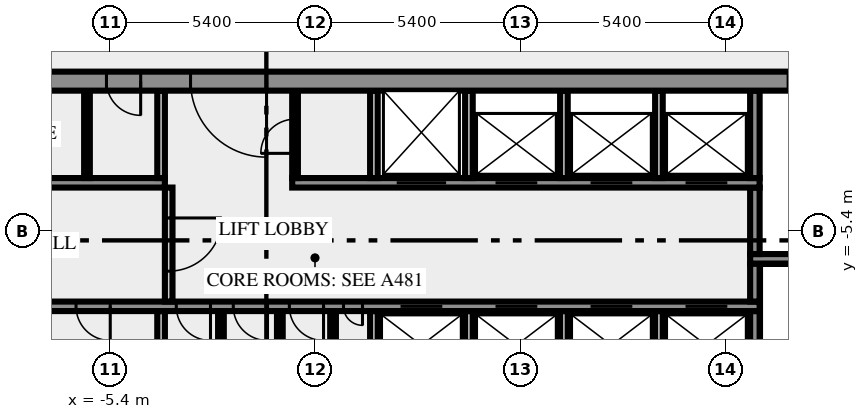
"""IFC4 building model, lengths in metres.
Left out: names, types, materials, properties, quantities, classifications, styles, units other than length and angle.
Written with IfcOpenShell. Run it as: python <this file> out.ifc"""

import sys

from ifc_helpers import new_model, si_unit, direction, frame, frame_2d, origin, place, context, subcontext, project, spatial, rectangle, extrude, element, fill, save


model = new_model("IFC4")
c1 = context("Model", 3, precision=1e-05, world=origin(), true_north=direction((0.0, 1.0)))
c2 = subcontext(c1, "Body", "Model", "MODEL_VIEW")
j1 = project(units=[si_unit("LENGTHUNIT", "METRE"), si_unit("PLANEANGLEUNIT", "RADIAN")], contexts=[c1])
p1 = place(None, origin())
s1 = spatial("IfcSite", under=j1, at=p1, CompositionType="ELEMENT")
p2 = place(p1, origin())
s2 = spatial("IfcBuilding", under=s1, at=p2, CompositionType="ELEMENT")
p3 = place(p2, frame((0.0, 0.0, 156.0)))
s3 = spatial("IfcBuildingStorey", under=s2, at=p3, CompositionType="ELEMENT", Elevation=156.0)
p4 = place(p3, frame((-4.05, -10.5, 0.0), z_axis=(0.0, 0.0, 1.0), x_axis=(0.0, 1.0, 0.0)))
e1 = element("IfcWall", 1, at=p4, inside=s3, PredefinedType="SOLIDWALL", context=c2, shape_type="SweptSolid", body=[
    extrude(rectangle(XDim=3.0, YDim=0.2, at=frame_2d((1.5, 0.0))), origin(), (0.0, 0.0, 1.0), 3.65),
])
for number, where, z_axis, x_axis in (
    (2, (-2.475, -10.5, 0.0), (0.0, 0.0, 1.0), (0.0, 1.0, 0.0)),
    (3, (-0.925, -10.5, 0.0), (0.0, 0.0, 1.0), (0.0, 1.0, 0.0)),
    (4, (0.475, -10.5, 0.0), (0.0, 0.0, 1.0), (0.0, 1.0, 0.0)),
):
    element("IfcWall", number, at=place(p3, frame(where, z_axis=z_axis, x_axis=x_axis)), inside=s3, PredefinedType="PARTITIONING", context=c2, shape_type="SweptSolid", body=[
        extrude(rectangle(XDim=3.0, YDim=0.15, at=frame_2d((1.5, 0.0))), origin(), (0.0, 0.0, 1.0), 3.65),
    ])
for number, where, z_axis, x_axis in (
    (5, (1.55, -10.5, 0.0), (0.0, 0.0, 1.0), (0.0, 1.0, 0.0)),
    (6, (4.05, -10.5, 0.0), (0.0, 0.0, 1.0), (0.0, 1.0, 0.0)),
    (7, (6.55, -10.5, 0.0), (0.0, 0.0, 1.0), (0.0, 1.0, 0.0)),
    (8, (9.05, -10.5, 0.0), (0.0, 0.0, 1.0), (0.0, 1.0, 0.0)),
):
    element("IfcWall", number, at=place(p3, frame(where, z_axis=z_axis, x_axis=x_axis)), inside=s3, PredefinedType="SOLIDWALL", context=c2, shape_type="SweptSolid", body=[
        extrude(rectangle(XDim=3.0, YDim=0.2, at=frame_2d((1.5, 0.0))), origin(), (0.0, 0.0, 1.0), 3.65),
    ])
p5 = place(p3, frame((11.575, -10.5, 0.0), z_axis=(0.0, 0.0, 1.0), x_axis=(0.0, 1.0, 0.0)))
e9 = element("IfcWall", 9, at=p5, inside=s3, PredefinedType="SHEAR", context=c2, shape_type="SweptSolid", body=[
    extrude(rectangle(XDim=3.0, YDim=0.25, at=frame_2d((1.5, 0.0))), origin(), (0.0, 0.0, 1.0), 3.65),
])
p6 = place(p3, frame((11.7, -7.375, 0.0), z_axis=(0.0, 0.0, 1.0), x_axis=(-1.0, 0.0, 0.0)))
e10 = element("IfcWall", 10, at=p6, inside=s3, PredefinedType="SHEAR", context=c2, shape_type="SweptSolid", body=[
    extrude(rectangle(XDim=23.4, YDim=0.25, at=frame_2d((11.7, 0.0))), origin(), (0.0, 0.0, 1.0), 3.65),
])
p7 = place(p6, frame((22.012, 0.0, 0.0)))
e11 = element("IfcOpeningElement", 11, at=p7, cuts=e10, PredefinedType="OPENING", context=c2, shape_type="SweptSolid", body=[
    extrude(rectangle(XDim=0.9, YDim=2.1, at=frame_2d((0.45, 1.05))), frame((0.0, 0.135, 0.0), z_axis=(0.0, -1.0, 0.0), x_axis=(1.0, 0.0, 0.0)), (0.0, 0.0, 1.0), 0.27),
])
p8 = place(p6, frame((20.05, 0.0, 0.0)))
e12 = element("IfcOpeningElement", 12, at=p8, cuts=e10, PredefinedType="OPENING", context=c2, shape_type="SweptSolid", body=[
    extrude(rectangle(XDim=0.9, YDim=2.1, at=frame_2d((0.45, 1.05))), frame((0.0, 0.135, 0.0), z_axis=(0.0, -1.0, 0.0), x_axis=(1.0, 0.0, 0.0)), (0.0, 0.0, 1.0), 0.27),
])
p9 = place(p6, frame((17.088, 0.0, 0.0)))
e13 = element("IfcOpeningElement", 13, at=p9, cuts=e10, PredefinedType="OPENING", context=c2, shape_type="SweptSolid", body=[
    extrude(rectangle(XDim=0.9, YDim=2.1, at=frame_2d((0.45, 1.05))), frame((0.0, 0.135, 0.0), z_axis=(0.0, -1.0, 0.0), x_axis=(1.0, 0.0, 0.0)), (0.0, 0.0, 1.0), 0.27),
])
p10 = place(p6, frame((14.45, 0.0, 0.0)))
e14 = element("IfcOpeningElement", 14, at=p10, cuts=e10, PredefinedType="OPENING", context=c2, shape_type="SweptSolid", body=[
    extrude(rectangle(XDim=0.9, YDim=2.1, at=frame_2d((0.45, 1.05))), frame((0.0, 0.135, 0.0), z_axis=(0.0, -1.0, 0.0), x_axis=(1.0, 0.0, 0.0)), (0.0, 0.0, 1.0), 0.27),
])
p11 = place(p6, frame((12.95, 0.0, 0.0)))
e15 = element("IfcOpeningElement", 15, at=p11, cuts=e10, PredefinedType="OPENING", context=c2, shape_type="SweptSolid", body=[
    extrude(rectangle(XDim=0.9, YDim=2.1, at=frame_2d((0.45, 1.05))), frame((0.0, 0.135, 0.0), z_axis=(0.0, -1.0, 0.0), x_axis=(1.0, 0.0, 0.0)), (0.0, 0.0, 1.0), 0.27),
])
p12 = place(p6, frame((11.475, 0.0, 0.0)))
e16 = element("IfcOpeningElement", 16, at=p12, cuts=e10, PredefinedType="OPENING", context=c2, shape_type="SweptSolid", body=[
    extrude(rectangle(XDim=0.9, YDim=2.1, at=frame_2d((0.45, 1.05))), frame((0.0, 0.135, 0.0), z_axis=(0.0, -1.0, 0.0), x_axis=(1.0, 0.0, 0.0)), (0.0, 0.0, 1.0), 0.27),
])
p13 = place(p6, frame((10.45, 0.0, 0.0)))
e17 = element("IfcOpeningElement", 17, at=p13, cuts=e10, PredefinedType="OPENING", context=c2, shape_type="SweptSolid", body=[
    extrude(rectangle(XDim=0.5, YDim=2.1, at=frame_2d((0.25, 1.05))), frame((0.0, 0.135, 0.0), z_axis=(0.0, -1.0, 0.0), x_axis=(1.0, 0.0, 0.0)), (0.0, 0.0, 1.0), 0.27),
])
p14 = place(p6, frame((8.35, 0.0, 0.0)))
e18 = element("IfcOpeningElement", 18, at=p14, cuts=e10, PredefinedType="OPENING", context=c2, shape_type="SweptSolid", body=[
    extrude(rectangle(XDim=1.1, YDim=2.1, at=frame_2d((0.55, 1.05))), frame((0.0, 0.135, 0.0), z_axis=(0.0, -1.0, 0.0), x_axis=(1.0, 0.0, 0.0)), (0.0, 0.0, 1.0), 0.27),
])
p15 = place(p6, frame((5.85, 0.0, 0.0)))
e19 = element("IfcOpeningElement", 19, at=p15, cuts=e10, PredefinedType="OPENING", context=c2, shape_type="SweptSolid", body=[
    extrude(rectangle(XDim=1.1, YDim=2.1, at=frame_2d((0.55, 1.05))), frame((0.0, 0.135, 0.0), z_axis=(0.0, -1.0, 0.0), x_axis=(1.0, 0.0, 0.0)), (0.0, 0.0, 1.0), 0.27),
])
p16 = place(p6, frame((3.35, 0.0, 0.0)))
e20 = element("IfcOpeningElement", 20, at=p16, cuts=e10, PredefinedType="OPENING", context=c2, shape_type="SweptSolid", body=[
    extrude(rectangle(XDim=1.1, YDim=2.1, at=frame_2d((0.55, 1.05))), frame((0.0, 0.135, 0.0), z_axis=(0.0, -1.0, 0.0), x_axis=(1.0, 0.0, 0.0)), (0.0, 0.0, 1.0), 0.27),
])
p17 = place(p6, frame((0.85, 0.0, 0.0)))
e21 = element("IfcOpeningElement", 21, at=p17, cuts=e10, PredefinedType="OPENING", context=c2, shape_type="SweptSolid", body=[
    extrude(rectangle(XDim=1.1, YDim=2.1, at=frame_2d((0.55, 1.05))), frame((0.0, 0.135, 0.0), z_axis=(0.0, -1.0, 0.0), x_axis=(1.0, 0.0, 0.0)), (0.0, 0.0, 1.0), 0.27),
])
p18 = place(p3, frame((-3.85, -4.25, 0.0), z_axis=(0.0, 0.0, 1.0), x_axis=(0.0, -1.0, 0.0)))
e22 = element("IfcWall", 22, at=p18, inside=s3, PredefinedType="SOLIDWALL", context=c2, shape_type="SweptSolid", body=[
    extrude(rectangle(XDim=3.0, YDim=0.2, at=frame_2d((1.5, 0.0))), origin(), (0.0, 0.0, 1.0), 3.65),
])
p19 = place(p18, frame((0.8, 0.0, 0.0)))
e23 = element("IfcOpeningElement", 23, at=p19, cuts=e22, PredefinedType="OPENING", context=c2, shape_type="SweptSolid", body=[
    extrude(rectangle(XDim=1.4, YDim=2.1, at=frame_2d((0.7, 1.05))), frame((0.0, 0.11, 0.0), z_axis=(0.0, -1.0, 0.0), x_axis=(1.0, 0.0, 0.0)), (0.0, 0.0, 1.0), 0.22),
])
p20 = place(p3, frame((11.575, -7.25, 0.0), z_axis=(0.0, 0.0, 1.0), x_axis=(0.0, 1.0, 0.0)))
e24 = element("IfcWall", 24, at=p20, inside=s3, PredefinedType="SHEAR", context=c2, shape_type="SweptSolid", body=[
    extrude(rectangle(XDim=1.0, YDim=0.25, at=frame_2d((0.5, 0.0))), origin(), (0.0, 0.0, 1.0), 3.65),
])
p21 = place(p3, frame((19.5, -6.125, 0.0), z_axis=(0.0, 0.0, 1.0), x_axis=(-1.0, 0.0, 0.0)))
e25 = element("IfcWall", 25, at=p21, inside=s3, PredefinedType="SHEAR", context=c2, shape_type="SweptSolid", body=[
    extrude(rectangle(XDim=8.05, YDim=0.25, at=frame_2d((4.025, 0.0))), origin(), (0.0, 0.0, 1.0), 3.65),
])
p22 = place(p21, frame((0.05, 0.0, 0.0)))
e26 = element("IfcOpeningElement", 26, at=p22, cuts=e25, PredefinedType="OPENING", context=c2, shape_type="SweptSolid", body=[
    extrude(rectangle(XDim=1.8, YDim=2.1, at=frame_2d((0.9, 1.05))), frame((0.0, 0.135, 0.0), z_axis=(0.0, -1.0, 0.0), x_axis=(1.0, 0.0, 0.0)), (0.0, 0.0, 1.0), 0.27),
])
p23 = place(p3, frame((11.575, -6.0, 0.0), z_axis=(0.0, 0.0, 1.0), x_axis=(0.0, 1.0, 0.0)))
e27 = element("IfcWall", 27, at=p23, inside=s3, PredefinedType="SHEAR", context=c2, shape_type="SweptSolid", body=[
    extrude(rectangle(XDim=1.75, YDim=0.25, at=frame_2d((0.875, 0.0))), origin(), (0.0, 0.0, 1.0), 3.65),
])
p24 = place(p3, frame((-11.7, -4.125, 0.0), z_axis=(0.0, 0.0, 1.0), x_axis=(1.0, 0.0, 0.0)))
e28 = element("IfcWall", 28, at=p24, inside=s3, PredefinedType="SHEAR", context=c2, shape_type="SweptSolid", body=[
    extrude(rectangle(XDim=7.75, YDim=0.25, at=frame_2d((3.875, 0.0))), origin(), (0.0, 0.0, 1.0), 3.65),
])
p25 = place(p3, frame((-0.6, -4.125, 0.0), z_axis=(0.0, 0.0, 1.0), x_axis=(1.0, 0.0, 0.0)))
e29 = element("IfcWall", 29, at=p25, inside=s3, PredefinedType="SHEAR", context=c2, shape_type="SweptSolid", body=[
    extrude(rectangle(XDim=12.3, YDim=0.25, at=frame_2d((6.15, 0.0))), origin(), (0.0, 0.0, 1.0), 3.65),
])
p26 = place(p25, frame((2.75, 0.0, 0.0)))
e30 = element("IfcOpeningElement", 30, at=p26, cuts=e29, PredefinedType="OPENING", context=c2, shape_type="SweptSolid", body=[
    extrude(rectangle(XDim=1.3, YDim=2.1, at=frame_2d((0.65, 1.05))), frame((0.0, 0.135, 0.0), z_axis=(0.0, -1.0, 0.0), x_axis=(1.0, 0.0, 0.0)), (0.0, 0.0, 1.0), 0.27),
])
p27 = place(p25, frame((5.35, 0.0, 0.0)))
e31 = element("IfcOpeningElement", 31, at=p27, cuts=e29, PredefinedType="OPENING", context=c2, shape_type="SweptSolid", body=[
    extrude(rectangle(XDim=1.1, YDim=2.1, at=frame_2d((0.55, 1.05))), frame((0.0, 0.135, 0.0), z_axis=(0.0, -1.0, 0.0), x_axis=(1.0, 0.0, 0.0)), (0.0, 0.0, 1.0), 0.27),
])
p28 = place(p25, frame((7.85, 0.0, 0.0)))
e32 = element("IfcOpeningElement", 32, at=p28, cuts=e29, PredefinedType="OPENING", context=c2, shape_type="SweptSolid", body=[
    extrude(rectangle(XDim=1.1, YDim=2.1, at=frame_2d((0.55, 1.05))), frame((0.0, 0.135, 0.0), z_axis=(0.0, -1.0, 0.0), x_axis=(1.0, 0.0, 0.0)), (0.0, 0.0, 1.0), 0.27),
])
p29 = place(p25, frame((10.35, 0.0, 0.0)))
e33 = element("IfcOpeningElement", 33, at=p29, cuts=e29, PredefinedType="OPENING", context=c2, shape_type="SweptSolid", body=[
    extrude(rectangle(XDim=1.1, YDim=2.1, at=frame_2d((0.55, 1.05))), frame((0.0, 0.135, 0.0), z_axis=(0.0, -1.0, 0.0), x_axis=(1.0, 0.0, 0.0)), (0.0, 0.0, 1.0), 0.27),
])
p30 = place(p3, frame((-6.0, -4.0, 0.0), z_axis=(0.0, 0.0, 1.0), x_axis=(0.0, 1.0, 0.0)))
e34 = element("IfcWall", 34, at=p30, inside=s3, PredefinedType="PARTITIONING", context=c2, shape_type="SweptSolid", body=[
    extrude(rectangle(XDim=2.3, YDim=0.15, at=frame_2d((1.15, 0.0))), origin(), (0.0, 0.0, 1.0), 3.65),
])
p31 = place(p3, frame((-4.05, -4.0, 0.0), z_axis=(0.0, 0.0, 1.0), x_axis=(0.0, 1.0, 0.0)))
e35 = element("IfcWall", 35, at=p31, inside=s3, PredefinedType="SOLIDWALL", context=c2, shape_type="SweptSolid", body=[
    extrude(rectangle(XDim=2.3, YDim=0.2, at=frame_2d((1.15, 0.0))), origin(), (0.0, 0.0, 1.0), 3.65),
])
p32 = place(p3, frame((-0.525, -4.0, 0.0), z_axis=(0.0, 0.0, 1.0), x_axis=(0.0, 1.0, 0.0)))
e36 = element("IfcWall", 36, at=p32, inside=s3, PredefinedType="PARTITIONING", context=c2, shape_type="SweptSolid", body=[
    extrude(rectangle(XDim=2.3, YDim=0.15, at=frame_2d((1.15, 0.0))), origin(), (0.0, 0.0, 1.0), 3.65),
])
p33 = place(p32, frame((0.65, 0.0, 0.0)))
e37 = element("IfcOpeningElement", 37, at=p33, cuts=e36, PredefinedType="OPENING", context=c2, shape_type="SweptSolid", body=[
    extrude(rectangle(XDim=0.9, YDim=2.1, at=frame_2d((0.45, 1.05))), frame((0.0, 0.085, 0.0), z_axis=(0.0, -1.0, 0.0), x_axis=(1.0, 0.0, 0.0)), (0.0, 0.0, 1.0), 0.17),
])
for number, where, z_axis, x_axis in (
    (38, (1.55, -4.0, 0.0), (0.0, 0.0, 1.0), (0.0, 1.0, 0.0)),
    (39, (4.05, -4.0, 0.0), (0.0, 0.0, 1.0), (0.0, 1.0, 0.0)),
    (40, (6.55, -4.0, 0.0), (0.0, 0.0, 1.0), (0.0, 1.0, 0.0)),
    (41, (9.05, -4.0, 0.0), (0.0, 0.0, 1.0), (0.0, 1.0, 0.0)),
):
    element("IfcWall", number, at=place(p3, frame(where, z_axis=z_axis, x_axis=x_axis)), inside=s3, PredefinedType="SOLIDWALL", context=c2, shape_type="SweptSolid", body=[
        extrude(rectangle(XDim=2.3, YDim=0.2, at=frame_2d((1.15, 0.0))), origin(), (0.0, 0.0, 1.0), 3.65),
    ])
p34 = place(p3, frame((11.575, -4.0, 0.0), z_axis=(0.0, 0.0, 1.0), x_axis=(0.0, 1.0, 0.0)))
e42 = element("IfcWall", 42, at=p34, inside=s3, PredefinedType="SHEAR", context=c2, shape_type="SweptSolid", body=[
    extrude(rectangle(XDim=2.3, YDim=0.25, at=frame_2d((1.15, 0.0))), origin(), (0.0, 0.0, 1.0), 3.65),
])
p35 = place(p3, frame((20.49, -1.45, 0.0), z_axis=(0.0, 0.0, 1.0), x_axis=(-1.0, 0.0, 0.0)))
e43 = element("IfcWall", 43, at=p35, inside=s3, PredefinedType="SHEAR", context=c2, shape_type="SweptSolid", body=[
    extrude(rectangle(XDim=40.98, YDim=0.5, at=frame_2d((20.49, 0.0))), origin(), (0.0, 0.0, 1.0), 3.65),
])
p36 = place(p35, frame((38.14, 0.0, 0.0)))
e44 = element("IfcOpeningElement", 44, at=p36, cuts=e43, PredefinedType="OPENING", context=c2, shape_type="SweptSolid", body=[
    extrude(rectangle(XDim=1.8, YDim=2.1, at=frame_2d((0.9, 1.05))), frame((0.0, 0.26, 0.0), z_axis=(0.0, -1.0, 0.0), x_axis=(1.0, 0.0, 0.0)), (0.0, 0.0, 1.0), 0.52),
])
p37 = place(p35, frame((35.89, 0.0, 0.0)))
e45 = element("IfcOpeningElement", 45, at=p37, cuts=e43, PredefinedType="OPENING", context=c2, shape_type="SweptSolid", body=[
    extrude(rectangle(XDim=0.9, YDim=2.1, at=frame_2d((0.45, 1.05))), frame((0.0, 0.26, 0.0), z_axis=(0.0, -1.0, 0.0), x_axis=(1.0, 0.0, 0.0)), (0.0, 0.0, 1.0), 0.52),
])
p38 = place(p35, frame((32.94, 0.0, 0.0)))
e46 = element("IfcOpeningElement", 46, at=p38, cuts=e43, PredefinedType="OPENING", context=c2, shape_type="SweptSolid", body=[
    extrude(rectangle(XDim=0.9, YDim=2.1, at=frame_2d((0.45, 1.05))), frame((0.0, 0.26, 0.0), z_axis=(0.0, -1.0, 0.0), x_axis=(1.0, 0.0, 0.0)), (0.0, 0.0, 1.0), 0.52),
])
p39 = place(p35, frame((28.802, 0.0, 0.0)))
e47 = element("IfcOpeningElement", 47, at=p39, cuts=e43, PredefinedType="OPENING", context=c2, shape_type="SweptSolid", body=[
    extrude(rectangle(XDim=0.9, YDim=2.1, at=frame_2d((0.45, 1.05))), frame((0.0, 0.26, 0.0), z_axis=(0.0, -1.0, 0.0), x_axis=(1.0, 0.0, 0.0)), (0.0, 0.0, 1.0), 0.52),
])
p40 = place(p35, frame((25.077, 0.0, 0.0)))
e48 = element("IfcOpeningElement", 48, at=p40, cuts=e43, PredefinedType="OPENING", context=c2, shape_type="SweptSolid", body=[
    extrude(rectangle(XDim=0.9, YDim=2.1, at=frame_2d((0.45, 1.05))), frame((0.0, 0.26, 0.0), z_axis=(0.0, -1.0, 0.0), x_axis=(1.0, 0.0, 0.0)), (0.0, 0.0, 1.0), 0.52),
])
p41 = place(p35, frame((21.765, 0.0, 0.0)))
e49 = element("IfcOpeningElement", 49, at=p41, cuts=e43, PredefinedType="OPENING", context=c2, shape_type="SweptSolid", body=[
    extrude(rectangle(XDim=2.0, YDim=2.1, at=frame_2d((1.0, 1.05))), frame((0.0, 0.26, 0.0), z_axis=(0.0, -1.0, 0.0), x_axis=(1.0, 0.0, 0.0)), (0.0, 0.0, 1.0), 0.52),
])
p42 = place(p35, frame((7.14, 0.0, 0.0)))
e50 = element("IfcOpeningElement", 50, at=p42, cuts=e43, PredefinedType="OPENING", context=c2, shape_type="SweptSolid", body=[
    extrude(rectangle(XDim=0.9, YDim=2.1, at=frame_2d((0.45, 1.05))), frame((0.0, 0.26, 0.0), z_axis=(0.0, -1.0, 0.0), x_axis=(1.0, 0.0, 0.0)), (0.0, 0.0, 1.0), 0.52),
])
p43 = place(p35, frame((5.028, 0.0, 0.0)))
e51 = element("IfcOpeningElement", 51, at=p43, cuts=e43, PredefinedType="OPENING", context=c2, shape_type="SweptSolid", body=[
    extrude(rectangle(XDim=0.8, YDim=2.1, at=frame_2d((0.4, 1.05))), frame((0.0, 0.26, 0.0), z_axis=(0.0, -1.0, 0.0), x_axis=(1.0, 0.0, 0.0)), (0.0, 0.0, 1.0), 0.52),
])
p44 = place(p35, frame((3.452, 0.0, 0.0)))
e52 = element("IfcOpeningElement", 52, at=p44, cuts=e43, PredefinedType="OPENING", context=c2, shape_type="SweptSolid", body=[
    extrude(rectangle(XDim=0.8, YDim=2.1, at=frame_2d((0.4, 1.05))), frame((0.0, 0.26, 0.0), z_axis=(0.0, -1.0, 0.0), x_axis=(1.0, 0.0, 0.0)), (0.0, 0.0, 1.0), 0.52),
])
p45 = place(p35, frame((1.04, 0.0, 0.0)))
e53 = element("IfcOpeningElement", 53, at=p45, cuts=e43, PredefinedType="OPENING", context=c2, shape_type="SweptSolid", body=[
    extrude(rectangle(XDim=1.8, YDim=2.1, at=frame_2d((0.9, 1.05))), frame((0.0, 0.26, 0.0), z_axis=(0.0, -1.0, 0.0), x_axis=(1.0, 0.0, 0.0)), (0.0, 0.0, 1.0), 0.52),
])
p46 = place(p9, origin())
e54 = element("IfcDoor", 54, at=p46, inside=s3, OperationType="SINGLE_SWING_RIGHT", PredefinedType="DOOR", context=c2, shape_type="SweptSolid", body=[
    extrude(rectangle(XDim=0.9, YDim=2.1, at=frame_2d((0.45, 1.05))), frame((0.0, 0.025, 0.0), z_axis=(0.0, -1.0, 0.0), x_axis=(1.0, 0.0, 0.0)), (0.0, 0.0, 1.0), 0.05),
])
fill(e13, e54)
p47 = place(p10, origin())
e55 = element("IfcDoor", 55, at=p47, inside=s3, OperationType="SINGLE_SWING_RIGHT", PredefinedType="DOOR", context=c2, shape_type="SweptSolid", body=[
    extrude(rectangle(XDim=0.9, YDim=2.1, at=frame_2d((0.45, 1.05))), frame((0.0, 0.025, 0.0), z_axis=(0.0, -1.0, 0.0), x_axis=(1.0, 0.0, 0.0)), (0.0, 0.0, 1.0), 0.05),
])
fill(e14, e55)
p48 = place(p11, origin())
e56 = element("IfcDoor", 56, at=p48, inside=s3, OperationType="SINGLE_SWING_RIGHT", PredefinedType="DOOR", context=c2, shape_type="SweptSolid", body=[
    extrude(rectangle(XDim=0.9, YDim=2.1, at=frame_2d((0.45, 1.05))), frame((0.0, 0.025, 0.0), z_axis=(0.0, -1.0, 0.0), x_axis=(1.0, 0.0, 0.0)), (0.0, 0.0, 1.0), 0.05),
])
fill(e15, e56)
p49 = place(p12, origin())
e57 = element("IfcDoor", 57, at=p49, inside=s3, OperationType="SINGLE_SWING_RIGHT", PredefinedType="DOOR", context=c2, shape_type="SweptSolid", body=[
    extrude(rectangle(XDim=0.9, YDim=2.1, at=frame_2d((0.45, 1.05))), frame((0.0, 0.025, 0.0), z_axis=(0.0, -1.0, 0.0), x_axis=(1.0, 0.0, 0.0)), (0.0, 0.0, 1.0), 0.05),
])
fill(e16, e57)
p50 = place(p13, origin())
e58 = element("IfcDoor", 58, at=p50, inside=s3, OperationType="SINGLE_SWING_LEFT", PredefinedType="DOOR", context=c2, shape_type="SweptSolid", body=[
    extrude(rectangle(XDim=0.5, YDim=2.1, at=frame_2d((0.25, 1.05))), frame((0.0, 0.025, 0.0), z_axis=(0.0, -1.0, 0.0), x_axis=(1.0, 0.0, 0.0)), (0.0, 0.0, 1.0), 0.05),
])
fill(e17, e58)
p51 = place(p14, origin())
e59 = element("IfcDoor", 59, at=p51, inside=s3, OperationType="DOUBLE_DOOR_SLIDING", PredefinedType="DOOR", context=c2, shape_type="SweptSolid", body=[
    extrude(rectangle(XDim=1.1, YDim=2.1, at=frame_2d((0.55, 1.05))), frame((0.0, 0.025, 0.0), z_axis=(0.0, -1.0, 0.0), x_axis=(1.0, 0.0, 0.0)), (0.0, 0.0, 1.0), 0.05),
])
fill(e18, e59)
p52 = place(p15, origin())
e60 = element("IfcDoor", 60, at=p52, inside=s3, OperationType="DOUBLE_DOOR_SLIDING", PredefinedType="DOOR", context=c2, shape_type="SweptSolid", body=[
    extrude(rectangle(XDim=1.1, YDim=2.1, at=frame_2d((0.55, 1.05))), frame((0.0, 0.025, 0.0), z_axis=(0.0, -1.0, 0.0), x_axis=(1.0, 0.0, 0.0)), (0.0, 0.0, 1.0), 0.05),
])
fill(e19, e60)
p53 = place(p16, origin())
e61 = element("IfcDoor", 61, at=p53, inside=s3, OperationType="DOUBLE_DOOR_SLIDING", PredefinedType="DOOR", context=c2, shape_type="SweptSolid", body=[
    extrude(rectangle(XDim=1.1, YDim=2.1, at=frame_2d((0.55, 1.05))), frame((0.0, 0.025, 0.0), z_axis=(0.0, -1.0, 0.0), x_axis=(1.0, 0.0, 0.0)), (0.0, 0.0, 1.0), 0.05),
])
fill(e20, e61)
p54 = place(p17, origin())
e62 = element("IfcDoor", 62, at=p54, inside=s3, OperationType="DOUBLE_DOOR_SLIDING", PredefinedType="DOOR", context=c2, shape_type="SweptSolid", body=[
    extrude(rectangle(XDim=1.1, YDim=2.1, at=frame_2d((0.55, 1.05))), frame((0.0, 0.025, 0.0), z_axis=(0.0, -1.0, 0.0), x_axis=(1.0, 0.0, 0.0)), (0.0, 0.0, 1.0), 0.05),
])
fill(e21, e62)
p55 = place(p19, origin())
e63 = element("IfcDoor", 63, at=p55, inside=s3, OperationType="DOUBLE_DOOR_SINGLE_SWING", PredefinedType="DOOR", context=c2, shape_type="SweptSolid", body=[
    extrude(rectangle(XDim=1.4, YDim=2.1, at=frame_2d((0.7, 1.05))), frame((0.0, 0.025, 0.0), z_axis=(0.0, -1.0, 0.0), x_axis=(1.0, 0.0, 0.0)), (0.0, 0.0, 1.0), 0.05),
])
fill(e23, e63)
p56 = place(p26, origin())
e64 = element("IfcDoor", 64, at=p56, inside=s3, OperationType="DOUBLE_DOOR_SLIDING", PredefinedType="DOOR", context=c2, shape_type="SweptSolid", body=[
    extrude(rectangle(XDim=1.3, YDim=2.1, at=frame_2d((0.65, 1.05))), frame((0.0, 0.025, 0.0), z_axis=(0.0, -1.0, 0.0), x_axis=(1.0, 0.0, 0.0)), (0.0, 0.0, 1.0), 0.05),
])
fill(e30, e64)
p57 = place(p27, origin())
e65 = element("IfcDoor", 65, at=p57, inside=s3, OperationType="DOUBLE_DOOR_SLIDING", PredefinedType="DOOR", context=c2, shape_type="SweptSolid", body=[
    extrude(rectangle(XDim=1.1, YDim=2.1, at=frame_2d((0.55, 1.05))), frame((0.0, 0.025, 0.0), z_axis=(0.0, -1.0, 0.0), x_axis=(1.0, 0.0, 0.0)), (0.0, 0.0, 1.0), 0.05),
])
fill(e31, e65)
p58 = place(p28, origin())
e66 = element("IfcDoor", 66, at=p58, inside=s3, OperationType="DOUBLE_DOOR_SLIDING", PredefinedType="DOOR", context=c2, shape_type="SweptSolid", body=[
    extrude(rectangle(XDim=1.1, YDim=2.1, at=frame_2d((0.55, 1.05))), frame((0.0, 0.025, 0.0), z_axis=(0.0, -1.0, 0.0), x_axis=(1.0, 0.0, 0.0)), (0.0, 0.0, 1.0), 0.05),
])
fill(e32, e66)
p59 = place(p29, origin())
e67 = element("IfcDoor", 67, at=p59, inside=s3, OperationType="DOUBLE_DOOR_SLIDING", PredefinedType="DOOR", context=c2, shape_type="SweptSolid", body=[
    extrude(rectangle(XDim=1.1, YDim=2.1, at=frame_2d((0.55, 1.05))), frame((0.0, 0.025, 0.0), z_axis=(0.0, -1.0, 0.0), x_axis=(1.0, 0.0, 0.0)), (0.0, 0.0, 1.0), 0.05),
])
fill(e33, e67)
p60 = place(p33, origin())
e68 = element("IfcDoor", 68, at=p60, inside=s3, OperationType="SINGLE_SWING_LEFT", PredefinedType="DOOR", context=c2, shape_type="SweptSolid", body=[
    extrude(rectangle(XDim=0.9, YDim=2.1, at=frame_2d((0.45, 1.05))), frame((0.0, 0.025, 0.0), z_axis=(0.0, -1.0, 0.0), x_axis=(1.0, 0.0, 0.0)), (0.0, 0.0, 1.0), 0.05),
])
fill(e37, e68)
p61 = place(p40, origin())
e69 = element("IfcDoor", 69, at=p61, inside=s3, OperationType="SINGLE_SWING_RIGHT", PredefinedType="DOOR", context=c2, shape_type="SweptSolid", body=[
    extrude(rectangle(XDim=0.9, YDim=2.1, at=frame_2d((0.45, 1.05))), frame((0.0, 0.025, 0.0), z_axis=(0.0, -1.0, 0.0), x_axis=(1.0, 0.0, 0.0)), (0.0, 0.0, 1.0), 0.05),
])
fill(e48, e69)
p62 = place(p41, origin())
e70 = element("IfcDoor", 70, at=p62, inside=s3, OperationType="DOUBLE_DOOR_SINGLE_SWING", PredefinedType="DOOR", context=c2, shape_type="SweptSolid", body=[
    extrude(rectangle(XDim=2.0, YDim=2.1, at=frame_2d((1.0, 1.05))), frame((0.0, 0.025, 0.0), z_axis=(0.0, -1.0, 0.0), x_axis=(1.0, 0.0, 0.0)), (0.0, 0.0, 1.0), 0.05),
])
fill(e49, e70)
save(model, sys.argv[1])
